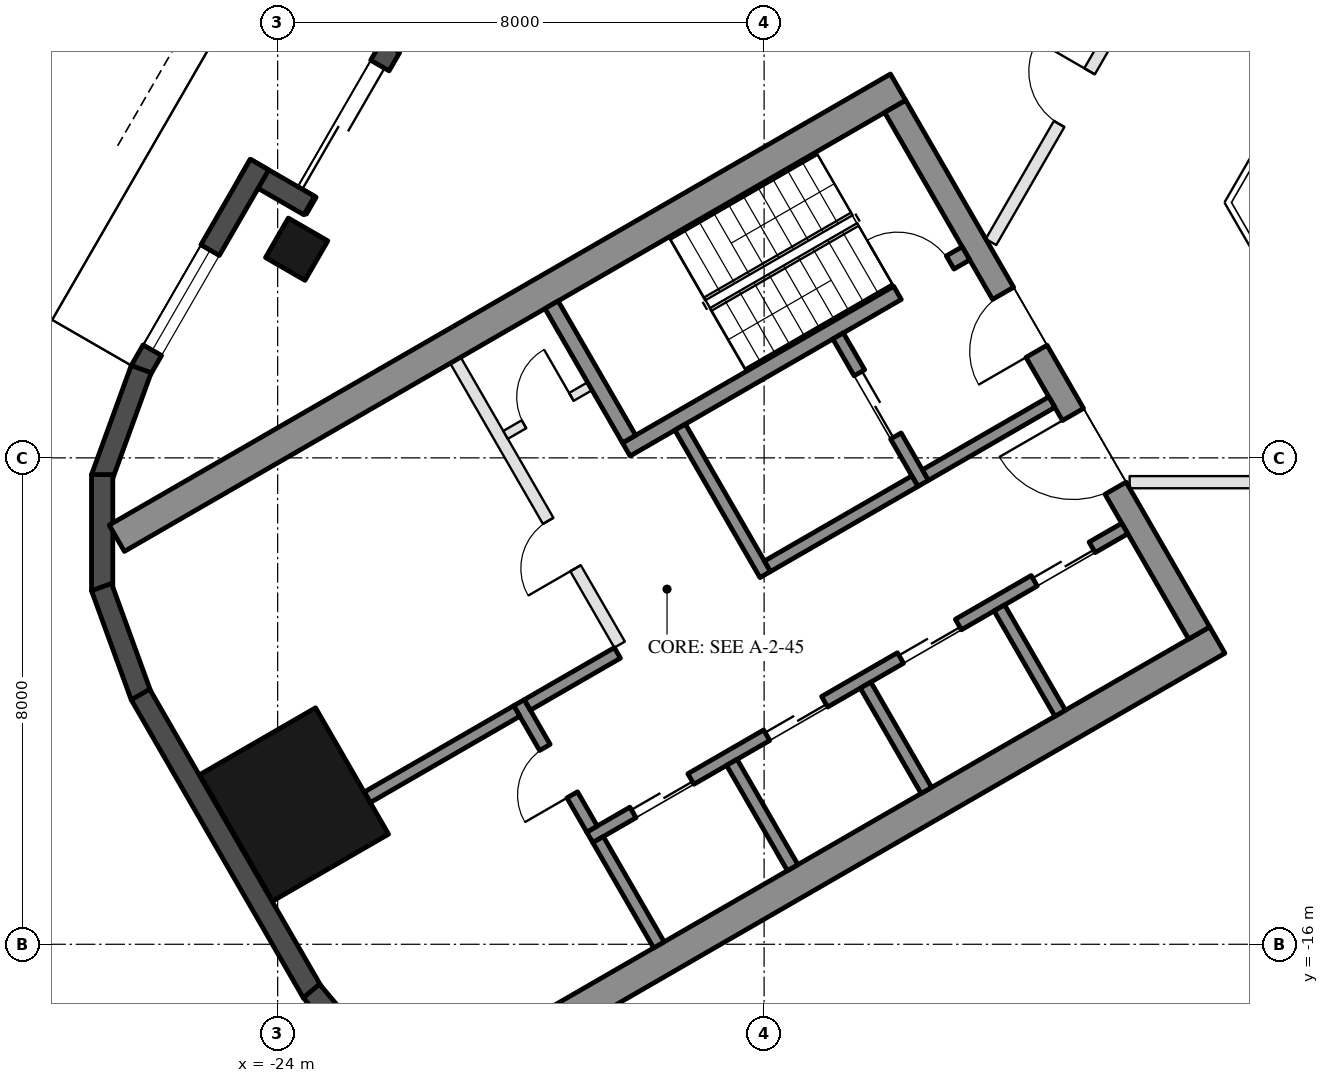
"""IFC4 building model, lengths in metres.
Left out: names, types, materials, properties, quantities, classifications, styles, units other than length and angle.
Written with IfcOpenShell. Run it as: python <this file> out.ifc"""

import sys

from ifc_helpers import new_model, si_unit, direction, frame, frame_2d, origin, origin_2d, place, context, subcontext, project, spatial, rectangle, hollow_rectangle, extrude, element, fill, save


model = new_model("IFC4")
c1 = context("Model", 3, precision=1e-05, world=origin(), true_north=direction((0.0, 1.0)))
c2 = subcontext(c1, "Body", "Model", "MODEL_VIEW")
j1 = project(units=[si_unit("LENGTHUNIT", "METRE"), si_unit("PLANEANGLEUNIT", "RADIAN")], contexts=[c1])
p1 = place(None, origin())
s1 = spatial("IfcSite", under=j1, at=p1, CompositionType="ELEMENT")
p2 = place(p1, origin())
s2 = spatial("IfcBuilding", under=s1, at=p2, CompositionType="ELEMENT")
p3 = place(p2, frame((0.0, 0.0, 191.0)))
s3 = spatial("IfcBuildingStorey", under=s2, at=p3, CompositionType="ELEMENT", Elevation=191.0)
p4 = place(p3, frame((-23.688, -4.568, 0.0), z_axis=(0.0, 0.0, 1.0), x_axis=(0.5, 0.866025403784, 0.0)))
e1 = element("IfcColumn", 1, at=p4, inside=s3, PredefinedType="COLUMN", context=c2, shape_type="SweptSolid", body=[
    extrude(hollow_rectangle(XDim=0.75, YDim=0.75, WallThickness=0.035, at=origin_2d()), origin(), (0.0, 0.0, 1.0), 3.7),
])
p5 = place(p3, frame((-23.729, -13.7, 0.0), z_axis=(0.0, 0.0, 1.0), x_axis=(-0.5, 0.866025403784, 0.0)))
e2 = element("IfcColumn", 2, at=p5, inside=s3, PredefinedType="COLUMN", context=c2, shape_type="SweptSolid", body=[
    extrude(hollow_rectangle(XDim=2.4, YDim=2.2, WallThickness=0.06, at=origin_2d()), origin(), (0.0, 0.0, 1.0), 3.7),
])
p6 = place(p3, frame((-20.309, 1.934, 0.0), z_axis=(0.0, 0.0, 1.0), x_axis=(-0.499992114976, -0.866029956157, 0.0)))
e3 = element("IfcWall", 3, at=p6, inside=s3, PredefinedType="SOLIDWALL", context=c2, shape_type="SweptSolid", body=[
    extrude(rectangle(XDim=6.74, YDim=0.35, at=frame_2d((3.37, 0.0))), origin(), (0.0, 0.0, 1.0), 3.55),
])
p7 = place(p6, frame((4.02, 0.0, 0.0)))
e4 = element("IfcOpeningElement", 4, at=p7, cuts=e3, PredefinedType="OPENING", context=c2, shape_type="SweptSolid", body=[
    extrude(rectangle(XDim=2.4, YDim=2.4, at=frame_2d((1.2, 1.2))), frame((0.0, 0.185, 0.0), z_axis=(0.0, -1.0, 0.0), x_axis=(1.0, 0.0, 0.0)), (0.0, 0.0, 1.0), 0.37),
])
p8 = place(p6, frame((0.77, 0.0, 0.3)))
e5 = element("IfcOpeningElement", 5, at=p8, cuts=e3, PredefinedType="OPENING", context=c2, shape_type="SweptSolid", body=[
    extrude(rectangle(XDim=2.9, YDim=2.65, at=frame_2d((1.45, 1.325))), frame((0.0, 0.185, 0.0), z_axis=(0.0, -1.0, 0.0), x_axis=(1.0, 0.0, 0.0)), (0.0, 0.0, 1.0), 0.37),
])
p9 = place(p3, frame((-23.481, -3.85, 0.0), z_axis=(0.0, 0.0, 1.0), x_axis=(-0.866092288191, 0.499884134912, 0.0)))
e6 = element("IfcWall", 6, at=p9, inside=s3, PredefinedType="SOLIDWALL", context=c2, shape_type="SweptSolid", body=[
    extrude(rectangle(XDim=1.22, YDim=0.35, at=frame_2d((0.61, 0.0))), origin(), (0.0, 0.0, 1.0), 3.55),
])
p10 = place(p3, frame((-24.299, -3.176, 0.0), z_axis=(0.0, 0.0, 1.0), x_axis=(-0.500028278809, -0.866009076391, 0.0)))
e7 = element("IfcWall", 7, at=p10, inside=s3, PredefinedType="SOLIDWALL", context=c2, shape_type="SweptSolid", body=[
    extrude(rectangle(XDim=3.916, YDim=0.35, at=frame_2d((1.958, 0.0))), origin(), (0.0, 0.0, 1.0), 3.55),
])
p11 = place(p10, frame((1.625, 0.0, 0.3)))
e8 = element("IfcOpeningElement", 8, at=p11, cuts=e7, PredefinedType="OPENING", context=c2, shape_type="SweptSolid", body=[
    extrude(rectangle(XDim=1.9, YDim=2.65, at=frame_2d((0.95, 1.325))), frame((0.0, 0.185, 0.0), z_axis=(0.0, -1.0, 0.0), x_axis=(1.0, 0.0, 0.0)), (0.0, 0.0, 1.0), 0.37),
])
for number, where, z_axis, x_axis in (
    (9, (-26.244, -6.54, 0.0), (0.0, 0.0, 1.0), (-0.342, -0.94, 0.0)),
    (10, (-26.886, -8.275, 0.0), (0.0, 0.0, 1.0), (0.0, -1.0, 0.0)),
    (11, (-26.897, -10.125, 0.0), (0.0, 0.0, 1.0), (0.342, -0.94, 0.0)),
):
    element("IfcWall", number, at=place(p3, frame(where, z_axis=z_axis, x_axis=x_axis)), inside=s3, PredefinedType="SOLIDWALL", context=c2, shape_type="SweptSolid", body=[
        extrude(rectangle(XDim=1.91, YDim=0.35, at=frame_2d((0.955, 0.0))), origin(), (0.0, 0.0, 1.0), 3.55),
    ])
p12 = place(p3, frame((-26.257, -11.893, 0.0), z_axis=(0.0, 0.0, 1.0), x_axis=(0.500018773155, -0.866014564827, 0.0)))
e12 = element("IfcWall", 12, at=p12, inside=s3, PredefinedType="SOLIDWALL", context=c2, shape_type="SweptSolid", body=[
    extrude(rectangle(XDim=5.658, YDim=0.35, at=frame_2d((2.829, 0.0))), origin(), (0.0, 0.0, 1.0), 3.55),
])
p13 = place(p3, frame((-23.445, -16.768, 0.0), z_axis=(0.0, 0.0, 1.0), x_axis=(0.642733291068, -0.76609001857, 0.0)))
e13 = element("IfcWall", 13, at=p13, inside=s3, PredefinedType="SOLIDWALL", context=c2, shape_type="SweptSolid", body=[
    extrude(rectangle(XDim=1.91, YDim=0.35, at=frame_2d((0.955, 0.0))), origin(), (0.0, 0.0, 1.0), 3.55),
])
for number, where, z_axis, x_axis in (
    (14, (-13.797, -1.903, 0.0), (0.0, 0.0, 1.0), (-0.866, -0.5, 0.0)),
    (15, (-8.547, -10.997, 0.0), (0.0, 0.0, 1.0), (-0.866, -0.5, 0.0)),
):
    element("IfcWall", number, at=place(p3, frame(where, z_axis=z_axis, x_axis=x_axis)), inside=s3, PredefinedType="SHEAR", context=c2, shape_type="SweptSolid", body=[
        extrude(rectangle(XDim=14.837, YDim=0.5, at=frame_2d((7.418, 0.0))), origin(), (0.0, 0.0, 1.0), 3.5),
    ])
p14 = place(p3, frame((-13.845, -2.22, 0.0), z_axis=(0.0, 0.0, 1.0), x_axis=(0.500004234368, -0.866022959057, 0.0)))
e16 = element("IfcWall", 16, at=p14, inside=s3, PredefinedType="SHEAR", context=c2, shape_type="SweptSolid", body=[
    extrude(rectangle(XDim=10.0, YDim=0.4, at=frame_2d((5.0, 0.0))), origin(), (0.0, 0.0, 1.0), 3.5),
])
p15 = place(p14, frame((3.55, 0.0, 0.0)))
e17 = element("IfcOpeningElement", 17, at=p15, cuts=e16, PredefinedType="OPENING", context=c2, shape_type="SweptSolid", body=[
    extrude(rectangle(XDim=1.1, YDim=2.1, at=frame_2d((0.55, 1.05))), frame((0.0, 0.21, 0.0), z_axis=(0.0, -1.0, 0.0), x_axis=(1.0, 0.0, 0.0)), (0.0, 0.0, 1.0), 0.42),
])
p16 = place(p14, frame((5.85, 0.0, 0.0)))
e18 = element("IfcOpeningElement", 18, at=p16, cuts=e16, PredefinedType="OPENING", context=c2, shape_type="SweptSolid", body=[
    extrude(rectangle(XDim=1.4, YDim=2.1, at=frame_2d((0.7, 1.05))), frame((0.0, 0.21, 0.0), z_axis=(0.0, -1.0, 0.0), x_axis=(1.0, 0.0, 0.0)), (0.0, 0.0, 1.0), 0.42),
])
p17 = place(p3, frame((-12.681, -4.636, 0.0), z_axis=(0.0, 0.0, 1.0), x_axis=(-0.866021702275, -0.500006411147, 0.0)))
e19 = element("IfcWall", 19, at=p17, inside=s3, PredefinedType="SHEAR", context=c2, shape_type="SweptSolid", body=[
    extrude(rectangle(XDim=6.45, YDim=0.25, at=frame_2d((3.225, 0.0))), origin(), (0.0, 0.0, 1.0), 3.5),
])
p18 = place(p17, frame((0.3, 0.0, 0.0)))
e20 = element("IfcOpeningElement", 20, at=p18, cuts=e19, PredefinedType="OPENING", context=c2, shape_type="SweptSolid", body=[
    extrude(rectangle(XDim=1.0, YDim=2.1, at=frame_2d((0.5, 1.05))), frame((0.0, 0.135, 0.0), z_axis=(0.0, -1.0, 0.0), x_axis=(1.0, 0.0, 0.0)), (0.0, 0.0, 1.0), 0.27),
])
p19 = place(p3, frame((-19.496, -5.482, 0.0), z_axis=(0.0, 0.0, 1.0), x_axis=(0.499990435942, -0.866030925526, 0.0)))
e21 = element("IfcWall", 21, at=p19, inside=s3, PredefinedType="SHEAR", context=c2, shape_type="SweptSolid", body=[
    extrude(rectangle(XDim=2.55, YDim=0.25, at=frame_2d((1.275, 0.0))), origin(), (0.0, 0.0, 1.0), 3.5),
])
p20 = place(p3, frame((-17.381, -7.495, 0.0), z_axis=(0.0, 0.0, 1.0), x_axis=(0.500011755427, -0.866018616679, 0.0)))
e22 = element("IfcWall", 22, at=p20, inside=s3, PredefinedType="SHEAR", context=c2, shape_type="SweptSolid", body=[
    extrude(rectangle(XDim=2.8, YDim=0.2, at=frame_2d((1.4, 0.0))), origin(), (0.0, 0.0, 1.0), 3.5),
])
p21 = place(p3, frame((-14.783, -5.995, 0.0), z_axis=(0.0, 0.0, 1.0), x_axis=(0.49994636267, -0.866056369097, 0.0)))
e23 = element("IfcWall", 23, at=p21, inside=s3, PredefinedType="SHEAR", context=c2, shape_type="SweptSolid", body=[
    extrude(rectangle(XDim=2.8, YDim=0.2, at=frame_2d((1.4, 0.0))), origin(), (0.0, 0.0, 1.0), 3.5),
])
p22 = place(p21, frame((0.7, 0.0, 0.0)))
e24 = element("IfcOpeningElement", 24, at=p22, cuts=e23, PredefinedType="OPENING", context=c2, shape_type="SweptSolid", body=[
    extrude(rectangle(XDim=1.2, YDim=2.1, at=frame_2d((0.6, 1.05))), frame((0.0, 0.11, 0.0), z_axis=(0.0, -1.0, 0.0), x_axis=(1.0, 0.0, 0.0)), (0.0, 0.0, 1.0), 0.22),
])
p23 = place(p3, frame((-13.52, -8.383, 0.0), z_axis=(0.0, 0.0, 1.0), x_axis=(-0.866034573852, -0.49998411664, 0.0)))
e25 = element("IfcWall", 25, at=p23, inside=s3, PredefinedType="SHEAR", context=c2, shape_type="SweptSolid", body=[
    extrude(rectangle(XDim=2.8, YDim=0.2, at=frame_2d((1.4, 0.0))), origin(), (0.0, 0.0, 1.0), 3.5),
])
p24 = place(p3, frame((-11.268, -7.083, 0.0), z_axis=(0.0, 0.0, 1.0), x_axis=(-0.866050077142, -0.499957262057, 0.0)))
e26 = element("IfcWall", 26, at=p24, inside=s3, PredefinedType="SHEAR", context=c2, shape_type="SweptSolid", body=[
    extrude(rectangle(XDim=2.4, YDim=0.2, at=frame_2d((1.2, 0.0))), origin(), (0.0, 0.0, 1.0), 3.5),
])
p25 = place(p3, frame((-10.068, -9.162, 0.0), z_axis=(0.0, 0.0, 1.0), x_axis=(-0.866032725843, -0.499987317609, 0.0)))
e27 = element("IfcWall", 27, at=p25, inside=s3, PredefinedType="SHEAR", context=c2, shape_type="SweptSolid", body=[
    extrude(rectangle(XDim=10.16, YDim=0.2, at=frame_2d((5.08, 0.0))), origin(), (0.0, 0.0, 1.0), 3.5),
])
p26 = place(p25, frame((0.62, 0.0, 0.0)))
e28 = element("IfcOpeningElement", 28, at=p26, cuts=e27, PredefinedType="OPENING", context=c2, shape_type="SweptSolid", body=[
    extrude(rectangle(XDim=1.1, YDim=2.1, at=frame_2d((0.55, 1.05))), frame((0.0, 0.11, 0.0), z_axis=(0.0, -1.0, 0.0), x_axis=(1.0, 0.0, 0.0)), (0.0, 0.0, 1.0), 0.22),
])
p27 = place(p25, frame((3.16, 0.0, 0.0)))
e29 = element("IfcOpeningElement", 29, at=p27, cuts=e27, PredefinedType="OPENING", context=c2, shape_type="SweptSolid", body=[
    extrude(rectangle(XDim=1.1, YDim=2.1, at=frame_2d((0.55, 1.05))), frame((0.0, 0.11, 0.0), z_axis=(0.0, -1.0, 0.0), x_axis=(1.0, 0.0, 0.0)), (0.0, 0.0, 1.0), 0.22),
])
p28 = place(p25, frame((5.7, 0.0, 0.0)))
e30 = element("IfcOpeningElement", 30, at=p28, cuts=e27, PredefinedType="OPENING", context=c2, shape_type="SweptSolid", body=[
    extrude(rectangle(XDim=1.1, YDim=2.1, at=frame_2d((0.55, 1.05))), frame((0.0, 0.11, 0.0), z_axis=(0.0, -1.0, 0.0), x_axis=(1.0, 0.0, 0.0)), (0.0, 0.0, 1.0), 0.22),
])
p29 = place(p25, frame((8.24, 0.0, 0.0)))
e31 = element("IfcOpeningElement", 31, at=p29, cuts=e27, PredefinedType="OPENING", context=c2, shape_type="SweptSolid", body=[
    extrude(rectangle(XDim=1.1, YDim=2.1, at=frame_2d((0.55, 1.05))), frame((0.0, 0.11, 0.0), z_axis=(0.0, -1.0, 0.0), x_axis=(1.0, 0.0, 0.0)), (0.0, 0.0, 1.0), 0.22),
])
p30 = place(p3, frame((-20.031, -12.026, 0.0), z_axis=(0.0, 0.0, 1.0), x_axis=(0.500033551112, -0.866006032174, 0.0)))
e32 = element("IfcWall", 32, at=p30, inside=s3, PredefinedType="SHEAR", context=c2, shape_type="SweptSolid", body=[
    extrude(rectangle(XDim=2.4, YDim=0.2, at=frame_2d((1.2, 0.0))), origin(), (0.0, 0.0, 1.0), 3.5),
])
p31 = place(p30, frame((0.85, 0.0, 0.0)))
e33 = element("IfcOpeningElement", 33, at=p31, cuts=e32, PredefinedType="OPENING", context=c2, shape_type="SweptSolid", body=[
    extrude(rectangle(XDim=0.9, YDim=2.1, at=frame_2d((0.45, 1.05))), frame((0.0, 0.11, 0.0), z_axis=(0.0, -1.0, 0.0), x_axis=(1.0, 0.0, 0.0)), (0.0, 0.0, 1.0), 0.22),
])
p32 = place(p3, frame((-18.413, -11.208, 0.0), z_axis=(0.0, 0.0, 1.0), x_axis=(-0.866038183914, -0.499977863513, 0.0)))
e34 = element("IfcWall", 34, at=p32, inside=s3, PredefinedType="SHEAR", context=c2, shape_type="SweptSolid", body=[
    extrude(rectangle(XDim=1.71, YDim=0.2, at=frame_2d((0.855, 0.0))), origin(), (0.0, 0.0, 1.0), 3.5),
])
for number, where, z_axis, x_axis in (
    (35, (-12.131, -10.468, 0.0), (0.0, 0.0, 1.0), (0.5, -0.866, 0.0)),
    (36, (-14.331, -11.738, 0.0), (0.0, 0.0, 1.0), (0.5, -0.866, 0.0)),
    (37, (-16.531, -13.008, 0.0), (0.0, 0.0, 1.0), (0.5, -0.866, 0.0)),
    (38, (-18.73, -14.278, 0.0), (0.0, 0.0, 1.0), (0.5, -0.866, 0.0)),
):
    element("IfcWall", number, at=place(p3, frame(where, z_axis=z_axis, x_axis=x_axis)), inside=s3, PredefinedType="SHEAR", context=c2, shape_type="SweptSolid", body=[
        extrude(rectangle(XDim=2.0, YDim=0.2, at=frame_2d((1.0, 0.0))), origin(), (0.0, 0.0, 1.0), 3.5),
    ])
p33 = place(p3, frame((-20.067, -12.163, 0.0), z_axis=(0.0, 0.0, 1.0), x_axis=(-0.866055327414, -0.49994816717, 0.0)))
e39 = element("IfcWall", 39, at=p33, inside=s3, PredefinedType="SHEAR", context=c2, shape_type="SweptSolid", body=[
    extrude(rectangle(XDim=2.84, YDim=0.2, at=frame_2d((1.42, 0.0))), origin(), (0.0, 0.0, 1.0), 3.5),
])
p34 = place(p3, frame((-21.076, -6.395, 0.0), z_axis=(0.0, 0.0, 1.0), x_axis=(0.50001468107, -0.866016927499, 0.0)))
e40 = element("IfcWall", 40, at=p34, inside=s3, PredefinedType="PARTITIONING", context=c2, shape_type="SweptSolid", body=[
    extrude(rectangle(XDim=5.4, YDim=0.2, at=frame_2d((2.7, 0.0))), origin(), (0.0, 0.0, 1.0), 3.5),
])
p35 = place(p34, frame((3.05, 0.0, 0.0)))
e41 = element("IfcOpeningElement", 41, at=p35, cuts=e40, PredefinedType="OPENING", context=c2, shape_type="SweptSolid", body=[
    extrude(rectangle(XDim=0.9, YDim=2.1, at=frame_2d((0.45, 1.05))), frame((0.0, 0.11, 0.0), z_axis=(0.0, -1.0, 0.0), x_axis=(1.0, 0.0, 0.0)), (0.0, 0.0, 1.0), 0.22),
])
p36 = place(p3, frame((-18.866, -6.822, 0.0), z_axis=(0.0, 0.0, 1.0), x_axis=(-0.866028054938, -0.499995408039, 0.0)))
e42 = element("IfcWall", 42, at=p36, inside=s3, PredefinedType="PARTITIONING", context=c2, shape_type="SweptSolid", body=[
    extrude(rectangle(XDim=1.6, YDim=0.15, at=frame_2d((0.8, 0.0))), origin(), (0.0, 0.0, 1.0), 3.5),
])
p37 = place(p36, frame((0.35, 0.0, 0.0)))
e43 = element("IfcOpeningElement", 43, at=p37, cuts=e42, PredefinedType="OPENING", context=c2, shape_type="SweptSolid", body=[
    extrude(rectangle(XDim=0.9, YDim=2.1, at=frame_2d((0.45, 1.05))), frame((0.0, 0.085, 0.0), z_axis=(0.0, -1.0, 0.0), x_axis=(1.0, 0.0, 0.0)), (0.0, 0.0, 1.0), 0.17),
])
p38 = place(p3, frame((-1.302, -8.4, 0.0), z_axis=(0.0, 0.0, 1.0), x_axis=(-1.0, 0.0, 0.0)))
e44 = element("IfcWall", 44, at=p38, inside=s3, PredefinedType="PARTITIONING", context=c2, shape_type="SweptSolid", body=[
    extrude(rectangle(XDim=8.686, YDim=0.2, at=frame_2d((4.343, 0.0))), origin(), (0.0, 0.0, 1.0), 2.95),
])
p39 = place(p38, frame((3.843, 0.0, 0.0)))
e45 = element("IfcOpeningElement", 45, at=p39, cuts=e44, PredefinedType="OPENING", context=c2, shape_type="SweptSolid", body=[
    extrude(rectangle(XDim=1.0, YDim=2.1, at=frame_2d((0.5, 1.05))), frame((0.0, 0.11, 0.0), z_axis=(0.0, -1.0, 0.0), x_axis=(1.0, 0.0, 0.0)), (0.0, 0.0, 1.0), 0.22),
])
p40 = place(p3, frame((-12.269, -4.45, 0.0), z_axis=(0.0, 0.0, 1.0), x_axis=(0.500026884667, 0.866009881359, 0.0)))
e46 = element("IfcWall", 46, at=p40, inside=s3, PredefinedType="PARTITIONING", context=c2, shape_type="SweptSolid", body=[
    extrude(rectangle(XDim=5.484, YDim=0.2, at=frame_2d((2.742, 0.0))), origin(), (0.0, 0.0, 1.0), 2.95),
])
p41 = place(p40, frame((2.242, 0.0, 0.0)))
e47 = element("IfcOpeningElement", 47, at=p41, cuts=e46, PredefinedType="OPENING", context=c2, shape_type="SweptSolid", body=[
    extrude(rectangle(XDim=1.0, YDim=2.1, at=frame_2d((0.5, 1.05))), frame((0.0, 0.11, 0.0), z_axis=(0.0, -1.0, 0.0), x_axis=(1.0, 0.0, 0.0)), (0.0, 0.0, 1.0), 0.22),
])
p42 = place(p7, frame((2.4, 0.0, 0.0), z_axis=(0.0, 0.0, 1.0), x_axis=(-1.0, 0.0, 0.0)))
e48 = element("IfcDoor", 48, at=p42, inside=s3, OperationType="SLIDING_TO_LEFT", PredefinedType="DOOR", context=c2, shape_type="SweptSolid", body=[
    extrude(rectangle(XDim=2.4, YDim=2.4, at=frame_2d((1.2, 1.2))), frame((0.0, 0.025, 0.0), z_axis=(0.0, -1.0, 0.0), x_axis=(1.0, 0.0, 0.0)), (0.0, 0.0, 1.0), 0.05),
])
fill(e4, e48)
p43 = place(p11, origin())
e49 = element("IfcWindow", 49, at=p43, inside=s3, PartitioningType="SINGLE_PANEL", PredefinedType="WINDOW", context=c2, shape_type="SweptSolid", body=[
    extrude(rectangle(XDim=1.9, YDim=2.65, at=frame_2d((0.95, 1.325))), frame((0.0, 0.03, 0.0), z_axis=(0.0, -1.0, 0.0), x_axis=(1.0, 0.0, 0.0)), (0.0, 0.0, 1.0), 0.06),
])
fill(e8, e49)
p44 = place(p22, origin())
e50 = element("IfcDoor", 50, at=p44, inside=s3, OperationType="DOUBLE_DOOR_SLIDING", PredefinedType="DOOR", context=c2, shape_type="SweptSolid", body=[
    extrude(rectangle(XDim=1.2, YDim=2.1, at=frame_2d((0.6, 1.05))), frame((0.0, 0.025, 0.0), z_axis=(0.0, -1.0, 0.0), x_axis=(1.0, 0.0, 0.0)), (0.0, 0.0, 1.0), 0.05),
])
fill(e24, e50)
p45 = place(p37, frame((0.9, 0.0, 0.0), z_axis=(0.0, 0.0, 1.0), x_axis=(-1.0, 0.0, 0.0)))
e51 = element("IfcDoor", 51, at=p45, inside=s3, OperationType="SINGLE_SWING_RIGHT", PredefinedType="DOOR", context=c2, shape_type="SweptSolid", body=[
    extrude(rectangle(XDim=0.9, YDim=2.1, at=frame_2d((0.45, 1.05))), frame((0.0, 0.025, 0.0), z_axis=(0.0, -1.0, 0.0), x_axis=(1.0, 0.0, 0.0)), (0.0, 0.0, 1.0), 0.05),
])
fill(e43, e51)
p46 = place(p26, origin())
e52 = element("IfcDoor", 52, at=p46, inside=s3, OperationType="DOUBLE_DOOR_SLIDING", PredefinedType="DOOR", context=c2, shape_type="SweptSolid", body=[
    extrude(rectangle(XDim=1.1, YDim=2.1, at=frame_2d((0.55, 1.05))), frame((0.0, 0.025, 0.0), z_axis=(0.0, -1.0, 0.0), x_axis=(1.0, 0.0, 0.0)), (0.0, 0.0, 1.0), 0.05),
])
fill(e28, e52)
p47 = place(p27, origin())
e53 = element("IfcDoor", 53, at=p47, inside=s3, OperationType="DOUBLE_DOOR_SLIDING", PredefinedType="DOOR", context=c2, shape_type="SweptSolid", body=[
    extrude(rectangle(XDim=1.1, YDim=2.1, at=frame_2d((0.55, 1.05))), frame((0.0, 0.025, 0.0), z_axis=(0.0, -1.0, 0.0), x_axis=(1.0, 0.0, 0.0)), (0.0, 0.0, 1.0), 0.05),
])
fill(e29, e53)
p48 = place(p28, origin())
e54 = element("IfcDoor", 54, at=p48, inside=s3, OperationType="DOUBLE_DOOR_SLIDING", PredefinedType="DOOR", context=c2, shape_type="SweptSolid", body=[
    extrude(rectangle(XDim=1.1, YDim=2.1, at=frame_2d((0.55, 1.05))), frame((0.0, 0.025, 0.0), z_axis=(0.0, -1.0, 0.0), x_axis=(1.0, 0.0, 0.0)), (0.0, 0.0, 1.0), 0.05),
])
fill(e30, e54)
p49 = place(p29, origin())
e55 = element("IfcDoor", 55, at=p49, inside=s3, OperationType="DOUBLE_DOOR_SLIDING", PredefinedType="DOOR", context=c2, shape_type="SweptSolid", body=[
    extrude(rectangle(XDim=1.1, YDim=2.1, at=frame_2d((0.55, 1.05))), frame((0.0, 0.025, 0.0), z_axis=(0.0, -1.0, 0.0), x_axis=(1.0, 0.0, 0.0)), (0.0, 0.0, 1.0), 0.05),
])
fill(e31, e55)
p50 = place(p31, frame((0.9, 0.0, 0.0), z_axis=(0.0, 0.0, 1.0), x_axis=(-1.0, 0.0, 0.0)))
e56 = element("IfcDoor", 56, at=p50, inside=s3, OperationType="SINGLE_SWING_LEFT", PredefinedType="DOOR", context=c2, shape_type="SweptSolid", body=[
    extrude(rectangle(XDim=0.9, YDim=2.1, at=frame_2d((0.45, 1.05))), frame((0.0, 0.025, 0.0), z_axis=(0.0, -1.0, 0.0), x_axis=(1.0, 0.0, 0.0)), (0.0, 0.0, 1.0), 0.05),
])
fill(e33, e56)
p51 = place(p35, frame((0.9, 0.0, 0.0), z_axis=(0.0, 0.0, 1.0), x_axis=(-1.0, 0.0, 0.0)))
e57 = element("IfcDoor", 57, at=p51, inside=s3, OperationType="SINGLE_SWING_LEFT", PredefinedType="DOOR", context=c2, shape_type="SweptSolid", body=[
    extrude(rectangle(XDim=0.9, YDim=2.1, at=frame_2d((0.45, 1.05))), frame((0.0, 0.025, 0.0), z_axis=(0.0, -1.0, 0.0), x_axis=(1.0, 0.0, 0.0)), (0.0, 0.0, 1.0), 0.05),
])
fill(e41, e57)
p52 = place(p15, frame((1.1, 0.0, 0.0), z_axis=(0.0, 0.0, 1.0), x_axis=(-1.0, 0.0, 0.0)))
e58 = element("IfcDoor", 58, at=p52, inside=s3, OperationType="SINGLE_SWING_LEFT", PredefinedType="DOOR", context=c2, shape_type="SweptSolid", body=[
    extrude(rectangle(XDim=1.1, YDim=2.1, at=frame_2d((0.55, 1.05))), frame((0.0, 0.025, 0.0), z_axis=(0.0, -1.0, 0.0), x_axis=(1.0, 0.0, 0.0)), (0.0, 0.0, 1.0), 0.05),
])
fill(e17, e58)
p53 = place(p16, frame((1.4, 0.0, 0.0), z_axis=(0.0, 0.0, 1.0), x_axis=(-1.0, 0.0, 0.0)))
e59 = element("IfcDoor", 59, at=p53, inside=s3, OperationType="DOUBLE_DOOR_SINGLE_SWING", PredefinedType="DOOR", context=c2, shape_type="SweptSolid", body=[
    extrude(rectangle(XDim=1.4, YDim=2.1, at=frame_2d((0.7, 1.05))), frame((0.0, 0.025, 0.0), z_axis=(0.0, -1.0, 0.0), x_axis=(1.0, 0.0, 0.0)), (0.0, 0.0, 1.0), 0.05),
])
fill(e18, e59)
p54 = place(p18, frame((1.0, 0.0, 0.0), z_axis=(0.0, 0.0, 1.0), x_axis=(-1.0, 0.0, 0.0)))
e60 = element("IfcDoor", 60, at=p54, inside=s3, OperationType="SINGLE_SWING_LEFT", PredefinedType="DOOR", context=c2, shape_type="SweptSolid", body=[
    extrude(rectangle(XDim=1.0, YDim=2.1, at=frame_2d((0.5, 1.05))), frame((0.0, 0.025, 0.0), z_axis=(0.0, -1.0, 0.0), x_axis=(1.0, 0.0, 0.0)), (0.0, 0.0, 1.0), 0.05),
])
fill(e20, e60)
p55 = place(p41, origin())
e61 = element("IfcDoor", 61, at=p55, inside=s3, OperationType="SINGLE_SWING_RIGHT", PredefinedType="DOOR", context=c2, shape_type="SweptSolid", body=[
    extrude(rectangle(XDim=1.0, YDim=2.1, at=frame_2d((0.5, 1.05))), frame((0.0, 0.025, 0.0), z_axis=(0.0, -1.0, 0.0), x_axis=(1.0, 0.0, 0.0)), (0.0, 0.0, 1.0), 0.05),
])
fill(e47, e61)
save(model, sys.argv[1])
